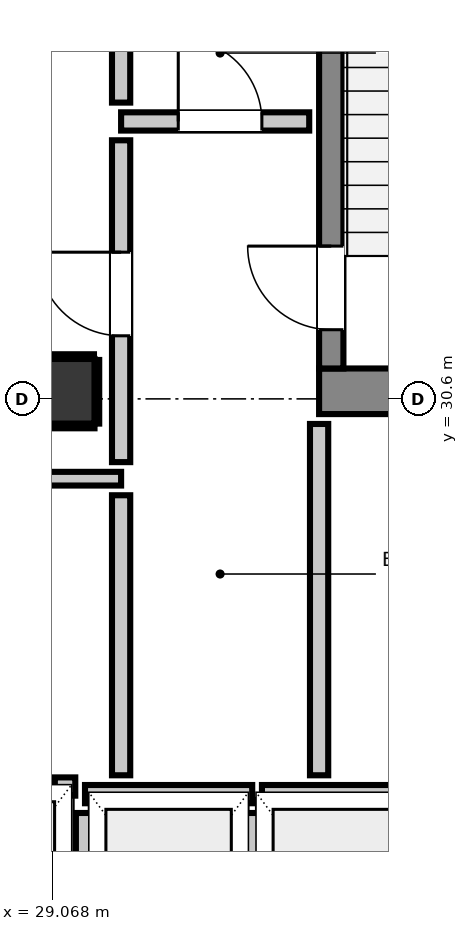
"""IFC4 building model, lengths in metres.
Left out: names, types, materials, properties, quantities, classifications, styles, units other than length and angle.
Written with IfcOpenShell. Run it as: python <this file> out.ifc"""

import sys

from ifc_helpers import new_model, si_unit, direction, frame, frame_2d, origin, origin_2d, place, context, subcontext, project, spatial, rectangle, extrude, element, fill, save


model = new_model("IFC4")
c1 = context("Model", 3, precision=1e-05, world=origin(), true_north=direction((0.0, 1.0)))
c2 = subcontext(c1, "Body", "Model", "MODEL_VIEW")
j1 = project(units=[si_unit("LENGTHUNIT", "METRE"), si_unit("PLANEANGLEUNIT", "RADIAN")], contexts=[c1])
p1 = place(None, origin())
s1 = spatial("IfcSite", under=j1, at=p1, CompositionType="ELEMENT")
p2 = place(p1, origin())
s2 = spatial("IfcBuilding", under=s1, at=p2, CompositionType="ELEMENT")
p3 = place(p2, frame((0.0, 0.0, 247.88)))
s3 = spatial("IfcBuildingStorey", under=s2, at=p3, CompositionType="ELEMENT", Elevation=247.88)
p4 = place(p3, frame((32.58, 30.7, 0.0), z_axis=(0.0, 0.0, 1.0), x_axis=(1.0, 0.0, 0.0)))
e1 = element("IfcWall", 1, at=p4, inside=s3, PredefinedType="SHEAR", context=c2, shape_type="SweptSolid", body=[
    extrude(rectangle(XDim=3.54, YDim=0.6, at=frame_2d((1.77, 0.0))), origin(), (0.0, 0.0, 1.0), 3.32),
])
p5 = place(p3, frame((32.74, 31.0, 0.0), z_axis=(0.0, 0.0, 1.0), x_axis=(0.0, 1.0, 0.0)))
e2 = element("IfcWall", 2, at=p5, inside=s3, PredefinedType="SHEAR", context=c2, shape_type="SweptSolid", body=[
    extrude(rectangle(XDim=7.8, YDim=0.32, at=frame_2d((3.9, 0.0))), origin(), (0.0, 0.0, 1.0), 3.32),
])
p6 = place(p5, frame((0.51, 0.0, 0.0)))
e3 = element("IfcOpeningElement", 3, at=p6, cuts=e2, PredefinedType="OPENING", context=c2, shape_type="SweptSolid", body=[
    extrude(rectangle(XDim=1.1, YDim=2.15, at=frame_2d((0.55, 1.075))), frame((0.0, 0.17, 0.0), z_axis=(0.0, -1.0, 0.0), x_axis=(1.0, 0.0, 0.0)), (0.0, 0.0, 1.0), 0.34),
])
p7 = place(p3, frame((29.2, 30.7, 0.0), z_axis=(0.0, 0.0, 1.0), x_axis=(1.0, 0.0, 0.0)))
e4 = element("IfcColumn", 4, at=p7, inside=s3, PredefinedType="COLUMN", context=c2, shape_type="SweptSolid", body=[
    extrude(rectangle(XDim=0.85, YDim=0.85, at=origin_2d()), origin(), (0.0, 0.0, 1.0), 3.32),
])
p8 = place(p3, frame((29.5, 25.4, 0.0), z_axis=(0.0, 0.0, 1.0), x_axis=(1.0, 0.0, 0.0)))
e5 = element("IfcWall", 5, at=p8, inside=s3, PredefinedType="PARTITIONING", context=c2, shape_type="SweptSolid", body=[
    extrude(rectangle(XDim=2.2, YDim=0.24, at=frame_2d((1.1, 0.0))), origin(), (0.0, 0.0, 1.0), 2.9),
])
p9 = place(p3, frame((29.5, 22.848, 0.0), z_axis=(0.0, 0.0, 1.0), x_axis=(0.0, 1.0, 0.0)))
e6 = element("IfcWall", 6, at=p9, inside=s3, PredefinedType="PARTITIONING", context=c2, shape_type="SweptSolid", body=[
    extrude(rectangle(XDim=2.304, YDim=0.24, at=frame_2d((1.152, 0.0))), origin(), (0.0, 0.0, 1.0), 0.905),
])
p10 = place(p3, frame((31.7, 22.848, 0.0), z_axis=(0.0, 0.0, 1.0), x_axis=(0.0, 1.0, 0.0)))
e7 = element("IfcWall", 7, at=p10, inside=s3, PredefinedType="PARTITIONING", context=c2, shape_type="SweptSolid", body=[
    extrude(rectangle(XDim=2.304, YDim=0.24, at=frame_2d((1.152, 0.0))), origin(), (0.0, 0.0, 1.0), 2.9),
])
p11 = place(p3, frame((31.828, 25.4, 0.0), z_axis=(0.0, 0.0, 1.0), x_axis=(1.0, 0.0, 0.0)))
e8 = element("IfcWall", 8, at=p11, inside=s3, PredefinedType="PARTITIONING", context=c2, shape_type="SweptSolid", body=[
    extrude(rectangle(XDim=2.072, YDim=0.24, at=frame_2d((1.036, 0.0))), origin(), (0.0, 0.0, 1.0), 2.9),
])
p12 = place(p3, frame((29.103, 25.5, 0.0), z_axis=(0.0, 0.0, 1.0), x_axis=(1.0, 0.0, 0.0)))
e9 = element("IfcWall", 9, at=p12, inside=s3, PredefinedType="PARTITIONING", context=c2, shape_type="SweptSolid", body=[
    extrude(rectangle(XDim=0.269, YDim=0.24, at=frame_2d((0.135, 0.0))), origin(), (0.0, 0.0, 1.0), 2.9),
])
p13 = place(p3, frame((29.975, 34.25, 0.0), z_axis=(0.0, 0.0, 1.0), x_axis=(1.0, 0.0, 0.0)))
e10 = element("IfcWall", 10, at=p13, inside=s3, PredefinedType="PARTITIONING", context=c2, shape_type="SweptSolid", body=[
    extrude(rectangle(XDim=2.475, YDim=0.24, at=frame_2d((1.237, 0.0))), origin(), (0.0, 0.0, 1.0), 2.9),
])
p14 = place(p13, frame((0.752, 0.0, 0.0)))
e11 = element("IfcOpeningElement", 11, at=p14, cuts=e10, PredefinedType="OPENING", context=c2, shape_type="SweptSolid", body=[
    extrude(rectangle(XDim=1.1, YDim=2.15, at=frame_2d((0.55, 1.075))), frame((0.0, 0.13, 0.0), z_axis=(0.0, -1.0, 0.0), x_axis=(1.0, 0.0, 0.0)), (0.0, 0.0, 1.0), 0.26),
])
p15 = place(p3, frame((28.593, 29.55, 0.0), z_axis=(0.0, 0.0, 1.0), x_axis=(1.0, 0.0, 0.0)))
e12 = element("IfcWall", 12, at=p15, inside=s3, PredefinedType="PARTITIONING", context=c2, shape_type="SweptSolid", body=[
    extrude(rectangle(XDim=1.382, YDim=0.18, at=frame_2d((0.691, 0.0))), origin(), (0.0, 0.0, 1.0), 2.9),
])
p16 = place(p3, frame((29.975, 25.648, 0.0), z_axis=(0.0, 0.0, 1.0), x_axis=(0.0, 1.0, 0.0)))
e13 = element("IfcWall", 13, at=p16, inside=s3, PredefinedType="PARTITIONING", context=c2, shape_type="SweptSolid", body=[
    extrude(rectangle(XDim=3.684, YDim=0.24, at=frame_2d((1.842, 0.0))), origin(), (0.0, 0.0, 1.0), 2.9),
])
p17 = place(p3, frame((29.975, 29.768, 0.0), z_axis=(0.0, 0.0, 1.0), x_axis=(0.0, 1.0, 0.0)))
e14 = element("IfcWall", 14, at=p17, inside=s3, PredefinedType="PARTITIONING", context=c2, shape_type="SweptSolid", body=[
    extrude(rectangle(XDim=4.234, YDim=0.24, at=frame_2d((2.117, 0.0))), origin(), (0.0, 0.0, 1.0), 2.9),
])
p18 = place(p17, frame((1.662, 0.0, 0.0)))
e15 = element("IfcOpeningElement", 15, at=p18, cuts=e14, PredefinedType="OPENING", context=c2, shape_type="SweptSolid", body=[
    extrude(rectangle(XDim=1.1, YDim=2.15, at=frame_2d((0.55, 1.075))), frame((0.0, 0.13, 0.0), z_axis=(0.0, -1.0, 0.0), x_axis=(1.0, 0.0, 0.0)), (0.0, 0.0, 1.0), 0.26),
])
p19 = place(p3, frame((29.975, 34.498, 0.0), z_axis=(0.0, 0.0, 1.0), x_axis=(0.0, 1.0, 0.0)))
e16 = element("IfcWall", 16, at=p19, inside=s3, PredefinedType="PARTITIONING", context=c2, shape_type="SweptSolid", body=[
    extrude(rectangle(XDim=0.924, YDim=0.24, at=frame_2d((0.462, 0.0))), origin(), (0.0, 0.0, 1.0), 2.9),
])
p20 = place(p3, frame((32.58, 25.648, 0.0), z_axis=(0.0, 0.0, 1.0), x_axis=(0.0, 1.0, 0.0)))
e17 = element("IfcWall", 17, at=p20, inside=s3, PredefinedType="PARTITIONING", context=c2, shape_type="SweptSolid", body=[
    extrude(rectangle(XDim=4.622, YDim=0.24, at=frame_2d((2.311, 0.0))), origin(), (0.0, 0.0, 1.0), 2.9),
])
p21 = place(p3, frame((28.775, 30.243, 0.0), z_axis=(0.0, 0.0, 1.0), x_axis=(1.0, 0.0, 0.0)))
e18 = element("IfcWall", 18, at=p21, inside=s3, PredefinedType="PARTITIONING", context=c2, shape_type="SweptSolid", body=[
    extrude(rectangle(XDim=0.85, YDim=0.06, at=frame_2d((0.425, 0.0))), origin(), (0.0, 0.0, 1.0), 0.905),
])
p22 = place(p3, frame((28.775, 31.157, 0.0), z_axis=(0.0, 0.0, 1.0), x_axis=(1.0, 0.0, 0.0)))
e19 = element("IfcWall", 19, at=p22, inside=s3, PredefinedType="PARTITIONING", context=c2, shape_type="SweptSolid", body=[
    extrude(rectangle(XDim=0.843, YDim=0.06, at=frame_2d((0.421, 0.0))), origin(), (0.0, 0.0, 1.0), 0.905),
])
p23 = place(p3, frame((29.657, 30.275, 0.0), z_axis=(0.0, 0.0, 1.0), x_axis=(0.0, 1.0, 0.0)))
e20 = element("IfcWall", 20, at=p23, inside=s3, PredefinedType="PARTITIONING", context=c2, shape_type="SweptSolid", body=[
    extrude(rectangle(XDim=0.837, YDim=0.06, at=frame_2d((0.418, 0.0))), origin(), (0.0, 0.0, 1.0), 0.905),
])
p24 = place(p6, origin())
e21 = element("IfcDoor", 21, at=p24, inside=s3, OperationType="SINGLE_SWING_RIGHT", PredefinedType="DOOR", context=c2, shape_type="SweptSolid", body=[
    extrude(rectangle(XDim=1.1, YDim=2.15, at=frame_2d((0.55, 1.075))), frame((0.0, 0.025, 0.0), z_axis=(0.0, -1.0, 0.0), x_axis=(1.0, 0.0, 0.0)), (0.0, 0.0, 1.0), 0.05),
])
fill(e3, e21)
p25 = place(p18, origin())
e22 = element("IfcDoor", 22, at=p25, inside=s3, OperationType="SINGLE_SWING_RIGHT", PredefinedType="DOOR", context=c2, shape_type="SweptSolid", body=[
    extrude(rectangle(XDim=1.1, YDim=2.15, at=frame_2d((0.55, 1.075))), frame((0.0, 0.025, 0.0), z_axis=(0.0, -1.0, 0.0), x_axis=(1.0, 0.0, 0.0)), (0.0, 0.0, 1.0), 0.05),
])
fill(e15, e22)
p26 = place(p14, origin())
e23 = element("IfcDoor", 23, at=p26, inside=s3, OperationType="SINGLE_SWING_LEFT", PredefinedType="DOOR", context=c2, shape_type="SweptSolid", body=[
    extrude(rectangle(XDim=1.1, YDim=2.15, at=frame_2d((0.55, 1.075))), frame((0.0, 0.025, 0.0), z_axis=(0.0, -1.0, 0.0), x_axis=(1.0, 0.0, 0.0)), (0.0, 0.0, 1.0), 0.05),
])
fill(e11, e23)
save(model, sys.argv[1])
